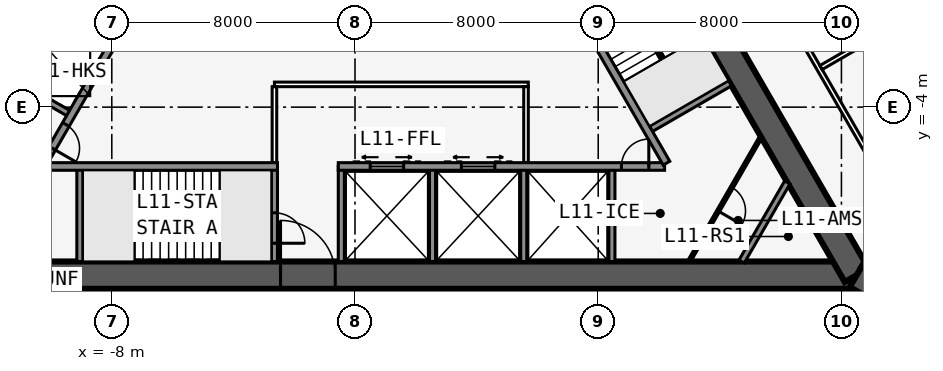
"""IFC4 building model, lengths in metres.
Left out: names, types, materials, properties, quantities, classifications, styles, units other than length and angle.
Written with IfcOpenShell. Run it as: python <this file> out.ifc"""

import sys

from ifc_helpers import new_model, si_unit, direction, frame, frame_2d, origin, place, context, subcontext, project, spatial, rectangle, extrude, element, fill, save


model = new_model("IFC4")
c1 = context("Model", 3, precision=1e-05, world=origin(), true_north=direction((0.0, 1.0)))
c2 = subcontext(c1, "Body", "Model", "MODEL_VIEW")
j1 = project(units=[si_unit("LENGTHUNIT", "METRE"), si_unit("PLANEANGLEUNIT", "RADIAN")], contexts=[c1])
p1 = place(None, origin())
s1 = spatial("IfcSite", under=j1, at=p1, CompositionType="ELEMENT")
p2 = place(p1, origin())
s2 = spatial("IfcBuilding", under=s1, at=p2, CompositionType="ELEMENT")
p3 = place(p2, frame((0.0, 0.0, 48.9)))
s3 = spatial("IfcBuildingStorey", under=s2, at=p3, CompositionType="ELEMENT", Elevation=48.9)
p4 = place(p3, frame((-16.5, -9.526, 0.0), z_axis=(0.0, 0.0, 1.0), x_axis=(1.0, 0.0, 0.0)))
e1 = element("IfcWall", 1, at=p4, inside=s3, PredefinedType="SHEAR", context=c2, shape_type="SweptSolid", body=[
    extrude(rectangle(XDim=33.0, YDim=0.9, at=frame_2d((16.5, 0.0))), origin(), (0.0, 0.0, 1.0), 3.4),
])
p5 = place(p4, frame((14.05, 0.0, 0.0)))
e2 = element("IfcOpeningElement", 2, at=p5, cuts=e1, PredefinedType="OPENING", context=c2, shape_type="SweptSolid", body=[
    extrude(rectangle(XDim=1.8, YDim=2.13, at=frame_2d((0.9, 1.065))), frame((0.0, 0.46, 0.0), z_axis=(0.0, -1.0, 0.0), x_axis=(1.0, 0.0, 0.0)), (0.0, 0.0, 1.0), 0.92),
])
p6 = place(p3, frame((-10.183, -5.951, 0.0), z_axis=(0.0, 0.0, 1.0), x_axis=(1.0, 0.0, 0.0)))
e3 = element("IfcWall", 3, at=p6, inside=s3, PredefinedType="SOLIDWALL", context=c2, shape_type="SweptSolid", body=[
    extrude(rectangle(XDim=7.633, YDim=0.25, at=frame_2d((3.816, 0.0))), origin(), (0.0, 0.0, 1.0), 3.235),
])
p7 = place(p3, frame((-0.55, -5.951, 0.0), z_axis=(0.0, 0.0, 1.0), x_axis=(1.0, 0.0, 0.0)))
e4 = element("IfcWall", 4, at=p7, inside=s3, PredefinedType="SOLIDWALL", context=c2, shape_type="SweptSolid", body=[
    extrude(rectangle(XDim=10.733, YDim=0.25, at=frame_2d((5.366, 0.0))), origin(), (0.0, 0.0, 1.0), 3.235),
])
p8 = place(p7, frame((9.314, 0.0, 0.0)))
e5 = element("IfcOpeningElement", 5, at=p8, cuts=e4, PredefinedType="OPENING", context=c2, shape_type="SweptSolid", body=[
    extrude(rectangle(XDim=0.9, YDim=2.13, at=frame_2d((0.45, 1.065))), frame((0.0, 0.135, 0.0), z_axis=(0.0, -1.0, 0.0), x_axis=(1.0, 0.0, 0.0)), (0.0, 0.0, 1.0), 0.27),
])
p9 = place(p7, frame((1.05, 0.0, 0.0)))
e6 = element("IfcOpeningElement", 6, at=p9, cuts=e4, PredefinedType="OPENING", context=c2, shape_type="SweptSolid", body=[
    extrude(rectangle(XDim=1.1, YDim=2.13, at=frame_2d((0.55, 1.065))), frame((0.0, 0.135, 0.0), z_axis=(0.0, -1.0, 0.0), x_axis=(1.0, 0.0, 0.0)), (0.0, 0.0, 1.0), 0.27),
])
p10 = place(p7, frame((4.05, 0.0, 0.0)))
e7 = element("IfcOpeningElement", 7, at=p10, cuts=e4, PredefinedType="OPENING", context=c2, shape_type="SweptSolid", body=[
    extrude(rectangle(XDim=1.1, YDim=2.13, at=frame_2d((0.55, 1.065))), frame((0.0, 0.135, 0.0), z_axis=(0.0, -1.0, 0.0), x_axis=(1.0, 0.0, 0.0)), (0.0, 0.0, 1.0), 0.27),
])
p11 = place(p3, frame((-9.05, -5.951, 0.0), z_axis=(0.0, 0.0, 1.0), x_axis=(0.0, -1.0, 0.0)))
e8 = element("IfcWall", 8, at=p11, inside=s3, PredefinedType="SOLIDWALL", context=c2, shape_type="SweptSolid", body=[
    extrude(rectangle(XDim=3.125, YDim=0.2, at=frame_2d((1.562, 0.0))), origin(), (0.0, 0.0, 1.0), 3.235),
])
p12 = place(p3, frame((-2.65, -5.951, 0.0), z_axis=(0.0, 0.0, 1.0), x_axis=(0.0, -1.0, 0.0)))
e9 = element("IfcWall", 9, at=p12, inside=s3, PredefinedType="SOLIDWALL", context=c2, shape_type="SweptSolid", body=[
    extrude(rectangle(XDim=3.125, YDim=0.2, at=frame_2d((1.562, 0.0))), origin(), (0.0, 0.0, 1.0), 3.235),
])
p13 = place(p12, frame((1.525, 0.0, 0.0)))
e10 = element("IfcOpeningElement", 10, at=p13, cuts=e9, PredefinedType="OPENING", context=c2, shape_type="SweptSolid", body=[
    extrude(rectangle(XDim=1.0, YDim=2.13, at=frame_2d((0.5, 1.065))), frame((0.0, 0.11, 0.0), z_axis=(0.0, -1.0, 0.0), x_axis=(1.0, 0.0, 0.0)), (0.0, 0.0, 1.0), 0.22),
])
for number, where, z_axis, x_axis in (
    (11, (-0.45, -5.951, 0.0), (0.0, 0.0, 1.0), (0.0, -1.0, 0.0)),
    (12, (2.55, -5.951, 0.0), (0.0, 0.0, 1.0), (0.0, -1.0, 0.0)),
    (13, (5.55, -5.951, 0.0), (0.0, 0.0, 1.0), (0.0, -1.0, 0.0)),
    (14, (8.45, -5.951, 0.0), (0.0, 0.0, 1.0), (0.0, -1.0, 0.0)),
):
    element("IfcWall", number, at=place(p3, frame(where, z_axis=z_axis, x_axis=x_axis)), inside=s3, PredefinedType="SOLIDWALL", context=c2, shape_type="SweptSolid", body=[
        extrude(rectangle(XDim=3.125, YDim=0.2, at=frame_2d((1.562, 0.0))), origin(), (0.0, 0.0, 1.0), 3.235),
    ])
p14 = place(p3, frame((16.5, -9.526, 0.0), z_axis=(0.0, 0.0, 1.0), x_axis=(-0.499999749417, 0.866025548458, 0.0)))
e15 = element("IfcWall", 15, at=p14, inside=s3, PredefinedType="SHEAR", context=c2, shape_type="SweptSolid", body=[
    extrude(rectangle(XDim=33.0, YDim=0.9, at=frame_2d((16.5, 0.0))), origin(), (0.0, 0.0, 1.0), 3.4),
])
p15 = place(p14, frame((14.15, 0.0, 0.0)))
e16 = element("IfcOpeningElement", 16, at=p15, cuts=e15, PredefinedType="OPENING", context=c2, shape_type="SweptSolid", body=[
    extrude(rectangle(XDim=1.8, YDim=2.13, at=frame_2d((0.9, 1.065))), frame((0.0, 0.46, 0.0), z_axis=(0.0, -1.0, 0.0), x_axis=(1.0, 0.0, 0.0)), (0.0, 0.0, 1.0), 0.92),
])
p16 = place(p14, frame((12.6, 0.0, 0.0)))
e17 = element("IfcOpeningElement", 17, at=p16, cuts=e15, PredefinedType="OPENING", context=c2, shape_type="SweptSolid", body=[
    extrude(rectangle(XDim=1.0, YDim=2.13, at=frame_2d((0.5, 1.065))), frame((0.0, 0.46, 0.0), z_axis=(0.0, -1.0, 0.0), x_axis=(1.0, 0.0, 0.0)), (0.0, 0.0, 1.0), 0.92),
])
p17 = place(p3, frame((10.245, -5.843, 0.0), z_axis=(0.0, 0.0, 1.0), x_axis=(-0.499993009313, 0.866029439822, 0.0)))
e18 = element("IfcWall", 18, at=p17, inside=s3, PredefinedType="SOLIDWALL", context=c2, shape_type="SweptSolid", body=[
    extrude(rectangle(XDim=7.733, YDim=0.25, at=frame_2d((3.866, 0.0))), origin(), (0.0, 0.0, 1.0), 3.235),
])
p18 = place(p3, frame((9.629, -4.775, 0.0), z_axis=(0.0, 0.0, 1.0), x_axis=(0.866022959057, 0.500004234368, 0.0)))
e19 = element("IfcWall", 19, at=p18, inside=s3, PredefinedType="SOLIDWALL", context=c2, shape_type="SweptSolid", body=[
    extrude(rectangle(XDim=3.125, YDim=0.2, at=frame_2d((1.562, 0.0))), origin(), (0.0, 0.0, 1.0), 3.235),
])
p19 = place(p3, frame((0.0, 19.052, 0.0), z_axis=(0.0, 0.0, 1.0), x_axis=(-0.499999749417, -0.866025548458, 0.0)))
e20 = element("IfcWall", 20, at=p19, inside=s3, PredefinedType="SHEAR", context=c2, shape_type="SweptSolid", body=[
    extrude(rectangle(XDim=33.0, YDim=0.9, at=frame_2d((16.5, 0.0))), origin(), (0.0, 0.0, 1.0), 3.4),
])
p20 = place(p19, frame((14.15, 0.0, 0.0)))
e21 = element("IfcOpeningElement", 21, at=p20, cuts=e20, PredefinedType="OPENING", context=c2, shape_type="SweptSolid", body=[
    extrude(rectangle(XDim=1.8, YDim=2.13, at=frame_2d((0.9, 1.065))), frame((0.0, 0.46, 0.0), z_axis=(0.0, -1.0, 0.0), x_axis=(1.0, 0.0, 0.0)), (0.0, 0.0, 1.0), 0.92),
])
p21 = place(p19, frame((12.6, 0.0, 0.0)))
e22 = element("IfcOpeningElement", 22, at=p21, cuts=e20, PredefinedType="OPENING", context=c2, shape_type="SweptSolid", body=[
    extrude(rectangle(XDim=1.0, YDim=2.13, at=frame_2d((0.5, 1.065))), frame((0.0, 0.46, 0.0), z_axis=(0.0, -1.0, 0.0), x_axis=(1.0, 0.0, 0.0)), (0.0, 0.0, 1.0), 0.92),
])
p22 = place(p3, frame((-4.929, 3.365, 0.0), z_axis=(0.0, 0.0, 1.0), x_axis=(-0.499991433582, -0.866030349552, 0.0)))
e23 = element("IfcWall", 23, at=p22, inside=s3, PredefinedType="SOLIDWALL", context=c2, shape_type="SweptSolid", body=[
    extrude(rectangle(XDim=10.633, YDim=0.25, at=frame_2d((5.316, 0.0))), origin(), (0.0, 0.0, 1.0), 3.235),
])
p23 = place(p22, frame((9.164, 0.0, 0.0)))
e24 = element("IfcOpeningElement", 24, at=p23, cuts=e23, PredefinedType="OPENING", context=c2, shape_type="SweptSolid", body=[
    extrude(rectangle(XDim=0.9, YDim=2.13, at=frame_2d((0.45, 1.065))), frame((0.0, 0.135, 0.0), z_axis=(0.0, -1.0, 0.0), x_axis=(1.0, 0.0, 0.0)), (0.0, 0.0, 1.0), 0.27),
])
p24 = place(p3, frame((-9.329, -4.256, 0.0), z_axis=(0.0, 0.0, 1.0), x_axis=(-0.866022959057, 0.500004234368, 0.0)))
e25 = element("IfcWall", 25, at=p24, inside=s3, PredefinedType="SOLIDWALL", context=c2, shape_type="SweptSolid", body=[
    extrude(rectangle(XDim=3.125, YDim=0.2, at=frame_2d((1.562, 0.0))), origin(), (0.0, 0.0, 1.0), 3.235),
])
p25 = place(p3, frame((16.5, -9.526, 0.0), z_axis=(0.0, 0.0, 1.0), x_axis=(0.866031398331, -0.499989616998, 0.0)))
e26 = element("IfcWall", 26, at=p25, inside=s3, PredefinedType="SHEAR", context=c2, shape_type="SweptSolid", body=[
    extrude(rectangle(XDim=4.746, YDim=0.9, at=frame_2d((2.373, 0.0))), origin(), (0.0, 0.0, 1.0), 3.4),
])
p26 = place(p25, frame((1.8, 0.0, 0.0)))
e27 = element("IfcOpeningElement", 27, at=p26, cuts=e26, PredefinedType="OPENING", context=c2, shape_type="SweptSolid", body=[
    extrude(rectangle(XDim=1.8, YDim=2.13, at=frame_2d((0.9, 1.065))), frame((0.0, 0.46, 0.0), z_axis=(0.0, -1.0, 0.0), x_axis=(1.0, 0.0, 0.0)), (0.0, 0.0, 1.0), 0.92),
])
p27 = place(p3, frame((20.027, -10.985, 0.0), z_axis=(0.0, 0.0, 1.0), x_axis=(-0.500001677587, 0.866024435227, 0.0)))
e28 = element("IfcWall", 28, at=p27, inside=s3, PredefinedType="PARTITIONING", context=c2, shape_type="SweptSolid", body=[
    extrude(rectangle(XDim=39.054, YDim=0.15, at=frame_2d((19.527, 0.0))), origin(), (0.0, 0.0, 1.0), 3.235),
])
p28 = place(p27, frame((1.558, 0.0, 0.0)))
e29 = element("IfcOpeningElement", 29, at=p28, cuts=e28, PredefinedType="OPENING", context=c2, shape_type="SweptSolid", body=[
    extrude(rectangle(XDim=0.95, YDim=2.13, at=frame_2d((0.475, 1.065))), frame((0.0, 0.085, 0.0), z_axis=(0.0, -1.0, 0.0), x_axis=(1.0, 0.0, 0.0)), (0.0, 0.0, 1.0), 0.17),
])
p29 = place(p27, frame((12.152, 0.0, 0.0)))
e30 = element("IfcOpeningElement", 30, at=p29, cuts=e28, PredefinedType="OPENING", context=c2, shape_type="SweptSolid", body=[
    extrude(rectangle(XDim=0.95, YDim=2.13, at=frame_2d((0.475, 1.065))), frame((0.0, 0.085, 0.0), z_axis=(0.0, -1.0, 0.0), x_axis=(1.0, 0.0, 0.0)), (0.0, 0.0, 1.0), 0.17),
])
p30 = place(p27, frame((17.152, 0.0, 0.0)))
e31 = element("IfcOpeningElement", 31, at=p30, cuts=e28, PredefinedType="OPENING", context=c2, shape_type="SweptSolid", body=[
    extrude(rectangle(XDim=0.95, YDim=2.13, at=frame_2d((0.475, 1.065))), frame((0.0, 0.085, 0.0), z_axis=(0.0, -1.0, 0.0), x_axis=(1.0, 0.0, 0.0)), (0.0, 0.0, 1.0), 0.17),
])
p31 = place(p27, frame((21.552, 0.0, 0.0)))
e32 = element("IfcOpeningElement", 32, at=p31, cuts=e28, PredefinedType="OPENING", context=c2, shape_type="SweptSolid", body=[
    extrude(rectangle(XDim=0.95, YDim=2.13, at=frame_2d((0.475, 1.065))), frame((0.0, 0.085, 0.0), z_axis=(0.0, -1.0, 0.0), x_axis=(1.0, 0.0, 0.0)), (0.0, 0.0, 1.0), 0.17),
])
p32 = place(p27, frame((32.152, 0.0, 0.0)))
e33 = element("IfcOpeningElement", 33, at=p32, cuts=e28, PredefinedType="OPENING", context=c2, shape_type="SweptSolid", body=[
    extrude(rectangle(XDim=0.95, YDim=2.13, at=frame_2d((0.475, 1.065))), frame((0.0, 0.085, 0.0), z_axis=(0.0, -1.0, 0.0), x_axis=(1.0, 0.0, 0.0)), (0.0, 0.0, 1.0), 0.17),
])
p33 = place(p27, frame((37.752, 0.0, 0.0)))
e34 = element("IfcOpeningElement", 34, at=p33, cuts=e28, PredefinedType="OPENING", context=c2, shape_type="SweptSolid", body=[
    extrude(rectangle(XDim=0.95, YDim=2.13, at=frame_2d((0.475, 1.065))), frame((0.0, 0.085, 0.0), z_axis=(0.0, -1.0, 0.0), x_axis=(1.0, 0.0, 0.0)), (0.0, 0.0, 1.0), 0.17),
])
p34 = place(p3, frame((15.329, -2.697, 0.0), z_axis=(0.0, 0.0, 1.0), x_axis=(0.866018409083, 0.500012114982, 0.0)))
e35 = element("IfcWall", 35, at=p34, inside=s3, PredefinedType="PARTITIONING", context=c2, shape_type="SweptSolid", body=[
    extrude(rectangle(XDim=9.485, YDim=0.15, at=frame_2d((4.742, 0.0))), origin(), (0.0, 0.0, 1.0), 2.389),
])
p35 = place(p3, frame((-0.5, 22.836, 0.0), z_axis=(0.0, 0.0, 1.0), x_axis=(-0.500001677587, -0.866024435227, 0.0)))
e36 = element("IfcWall", 36, at=p35, inside=s3, PredefinedType="PARTITIONING", context=c2, shape_type="SweptSolid", body=[
    extrude(rectangle(XDim=39.054, YDim=0.15, at=frame_2d((19.527, 0.0))), origin(), (0.0, 0.0, 1.0), 3.235),
])
p36 = place(p35, frame((1.558, 0.0, 0.0)))
e37 = element("IfcOpeningElement", 37, at=p36, cuts=e36, PredefinedType="OPENING", context=c2, shape_type="SweptSolid", body=[
    extrude(rectangle(XDim=0.95, YDim=2.13, at=frame_2d((0.475, 1.065))), frame((0.0, 0.085, 0.0), z_axis=(0.0, -1.0, 0.0), x_axis=(1.0, 0.0, 0.0)), (0.0, 0.0, 1.0), 0.17),
])
p37 = place(p35, frame((12.752, 0.0, 0.0)))
e38 = element("IfcOpeningElement", 38, at=p37, cuts=e36, PredefinedType="OPENING", context=c2, shape_type="SweptSolid", body=[
    extrude(rectangle(XDim=0.95, YDim=2.13, at=frame_2d((0.475, 1.065))), frame((0.0, 0.085, 0.0), z_axis=(0.0, -1.0, 0.0), x_axis=(1.0, 0.0, 0.0)), (0.0, 0.0, 1.0), 0.17),
])
p38 = place(p35, frame((17.152, 0.0, 0.0)))
e39 = element("IfcOpeningElement", 39, at=p38, cuts=e36, PredefinedType="OPENING", context=c2, shape_type="SweptSolid", body=[
    extrude(rectangle(XDim=0.95, YDim=2.13, at=frame_2d((0.475, 1.065))), frame((0.0, 0.085, 0.0), z_axis=(0.0, -1.0, 0.0), x_axis=(1.0, 0.0, 0.0)), (0.0, 0.0, 1.0), 0.17),
])
p39 = place(p35, frame((22.152, 0.0, 0.0)))
e40 = element("IfcOpeningElement", 40, at=p39, cuts=e36, PredefinedType="OPENING", context=c2, shape_type="SweptSolid", body=[
    extrude(rectangle(XDim=0.95, YDim=2.13, at=frame_2d((0.475, 1.065))), frame((0.0, 0.085, 0.0), z_axis=(0.0, -1.0, 0.0), x_axis=(1.0, 0.0, 0.0)), (0.0, 0.0, 1.0), 0.17),
])
p40 = place(p35, frame((27.152, 0.0, 0.0)))
e41 = element("IfcOpeningElement", 41, at=p40, cuts=e36, PredefinedType="OPENING", context=c2, shape_type="SweptSolid", body=[
    extrude(rectangle(XDim=0.95, YDim=2.13, at=frame_2d((0.475, 1.065))), frame((0.0, 0.085, 0.0), z_axis=(0.0, -1.0, 0.0), x_axis=(1.0, 0.0, 0.0)), (0.0, 0.0, 1.0), 0.17),
])
p41 = place(p35, frame((36.546, 0.0, 0.0)))
e42 = element("IfcOpeningElement", 42, at=p41, cuts=e36, PredefinedType="OPENING", context=c2, shape_type="SweptSolid", body=[
    extrude(rectangle(XDim=0.95, YDim=2.13, at=frame_2d((0.475, 1.065))), frame((0.0, 0.085, 0.0), z_axis=(0.0, -1.0, 0.0), x_axis=(1.0, 0.0, 0.0)), (0.0, 0.0, 1.0), 0.17),
])
p42 = place(p3, frame((-2.65, -3.251, 0.0), z_axis=(0.0, 0.0, 1.0), x_axis=(1.0, 0.0, 0.0)))
e43 = element("IfcWall", 43, at=p42, inside=s3, PredefinedType="PARTITIONING", context=c2, shape_type="SweptSolid", body=[
    extrude(rectangle(XDim=8.35, YDim=0.15, at=frame_2d((4.175, 0.0))), origin(), (0.0, 0.0, 1.0), 3.235),
])
for number, where, z_axis, x_axis in (
    (44, (-2.65, -5.826, 0.0), (0.0, 0.0, 1.0), (0.0, 1.0, 0.0)),
    (45, (5.625, -5.826, 0.0), (0.0, 0.0, 1.0), (0.0, 1.0, 0.0)),
):
    element("IfcWall", number, at=place(p3, frame(where, z_axis=z_axis, x_axis=x_axis)), inside=s3, PredefinedType="PARTITIONING", context=c2, shape_type="SweptSolid", body=[
        extrude(rectangle(XDim=2.5, YDim=0.15, at=frame_2d((1.25, 0.0))), origin(), (0.0, 0.0, 1.0), 3.235),
    ])
p43 = place(p3, frame((14.219, -6.476, 0.0), z_axis=(0.0, 0.0, 1.0), x_axis=(-0.499952404951, -0.866052881055, 0.0)))
e46 = element("IfcWall", 46, at=p43, inside=s3, PredefinedType="SOLIDWALL", context=c2, shape_type="SweptSolid", body=[
    extrude(rectangle(XDim=3.002, YDim=0.2, at=frame_2d((1.501, 0.0))), origin(), (0.0, 0.0, 1.0), 3.235),
])
p44 = place(p3, frame((13.354, -4.976, 0.0), z_axis=(0.0, 0.0, 1.0), x_axis=(-0.499999210213, -0.866025859768, 0.0)))
e47 = element("IfcWall", 47, at=p44, inside=s3, PredefinedType="PARTITIONING", context=c2, shape_type="SweptSolid", body=[
    extrude(rectangle(XDim=4.734, YDim=0.1, at=frame_2d((2.367, 0.0))), origin(), (0.0, 0.0, 1.0), 3.235),
])
p45 = place(p44, frame((1.917, 0.0, 0.0)))
e48 = element("IfcOpeningElement", 48, at=p45, cuts=e47, PredefinedType="OPENING", context=c2, shape_type="SweptSolid", body=[
    extrude(rectangle(XDim=0.9, YDim=2.13, at=frame_2d((0.45, 1.065))), frame((0.0, 0.06, 0.0), z_axis=(0.0, -1.0, 0.0), x_axis=(1.0, 0.0, 0.0)), (0.0, 0.0, 1.0), 0.12),
])
p46 = place(p3, frame((-7.247, -7.576, 0.0), z_axis=(0.0, 0.0, 1.0), x_axis=(1.0, 0.0, 0.0)))
e49 = element("IfcWall", 49, at=p46, inside=s3, PredefinedType="SOLIDWALL", context=c2, shape_type="SweptSolid", body=[
    extrude(rectangle(XDim=2.794, YDim=0.1, at=frame_2d((1.397, 0.0))), origin(), (0.0, 0.0, 1.0), 3.4),
])
p47 = place(p3, frame((10.135, -2.401, 0.0), z_axis=(0.0, 0.0, 1.0), x_axis=(-0.499992232847, 0.866029888106, 0.0)))
e50 = element("IfcWall", 50, at=p47, inside=s3, PredefinedType="SOLIDWALL", context=c2, shape_type="SweptSolid", body=[
    extrude(rectangle(XDim=2.794, YDim=0.1, at=frame_2d((1.397, 0.0))), origin(), (0.0, 0.0, 1.0), 3.4),
])
p48 = place(p5, origin())
e51 = element("IfcDoor", 51, at=p48, inside=s3, OperationType="DOUBLE_DOOR_SINGLE_SWING", PredefinedType="DOOR", context=c2, shape_type="SweptSolid", body=[
    extrude(rectangle(XDim=1.8, YDim=2.13, at=frame_2d((0.9, 1.065))), frame((0.0, 0.025, 0.0), z_axis=(0.0, -1.0, 0.0), x_axis=(1.0, 0.0, 0.0)), (0.0, 0.0, 1.0), 0.05),
])
fill(e2, e51)
p49 = place(p13, origin())
e52 = element("IfcDoor", 52, at=p49, inside=s3, OperationType="SINGLE_SWING_RIGHT", PredefinedType="DOOR", context=c2, shape_type="SweptSolid", body=[
    extrude(rectangle(XDim=1.0, YDim=2.13, at=frame_2d((0.5, 1.065))), frame((0.0, 0.025, 0.0), z_axis=(0.0, -1.0, 0.0), x_axis=(1.0, 0.0, 0.0)), (0.0, 0.0, 1.0), 0.05),
])
fill(e10, e52)
p50 = place(p45, origin())
e53 = element("IfcDoor", 53, at=p50, inside=s3, OperationType="SINGLE_SWING_RIGHT", PredefinedType="DOOR", context=c2, shape_type="SweptSolid", body=[
    extrude(rectangle(XDim=0.9, YDim=2.13, at=frame_2d((0.45, 1.065))), frame((0.0, 0.025, 0.0), z_axis=(0.0, -1.0, 0.0), x_axis=(1.0, 0.0, 0.0)), (0.0, 0.0, 1.0), 0.05),
])
fill(e48, e53)
p51 = place(p8, origin())
e54 = element("IfcDoor", 54, at=p51, inside=s3, OperationType="SINGLE_SWING_RIGHT", PredefinedType="DOOR", context=c2, shape_type="SweptSolid", body=[
    extrude(rectangle(XDim=0.9, YDim=2.13, at=frame_2d((0.45, 1.065))), frame((0.0, 0.025, 0.0), z_axis=(0.0, -1.0, 0.0), x_axis=(1.0, 0.0, 0.0)), (0.0, 0.0, 1.0), 0.05),
])
fill(e5, e54)
p52 = place(p23, origin())
e55 = element("IfcDoor", 55, at=p52, inside=s3, OperationType="SINGLE_SWING_RIGHT", PredefinedType="DOOR", context=c2, shape_type="SweptSolid", body=[
    extrude(rectangle(XDim=0.9, YDim=2.13, at=frame_2d((0.45, 1.065))), frame((0.0, 0.025, 0.0), z_axis=(0.0, -1.0, 0.0), x_axis=(1.0, 0.0, 0.0)), (0.0, 0.0, 1.0), 0.05),
])
fill(e24, e55)
p53 = place(p9, origin())
e56 = element("IfcDoor", 56, at=p53, inside=s3, OperationType="DOUBLE_DOOR_SLIDING", PredefinedType="USERDEFINED", context=c2, shape_type="SweptSolid", body=[
    extrude(rectangle(XDim=1.1, YDim=2.13, at=frame_2d((0.55, 1.065))), frame((0.0, 0.025, 0.0), z_axis=(0.0, -1.0, 0.0), x_axis=(1.0, 0.0, 0.0)), (0.0, 0.0, 1.0), 0.05),
])
fill(e6, e56)
p54 = place(p10, origin())
e57 = element("IfcDoor", 57, at=p54, inside=s3, OperationType="DOUBLE_DOOR_SLIDING", PredefinedType="USERDEFINED", context=c2, shape_type="SweptSolid", body=[
    extrude(rectangle(XDim=1.1, YDim=2.13, at=frame_2d((0.55, 1.065))), frame((0.0, 0.025, 0.0), z_axis=(0.0, -1.0, 0.0), x_axis=(1.0, 0.0, 0.0)), (0.0, 0.0, 1.0), 0.05),
])
fill(e7, e57)
save(model, sys.argv[1])
